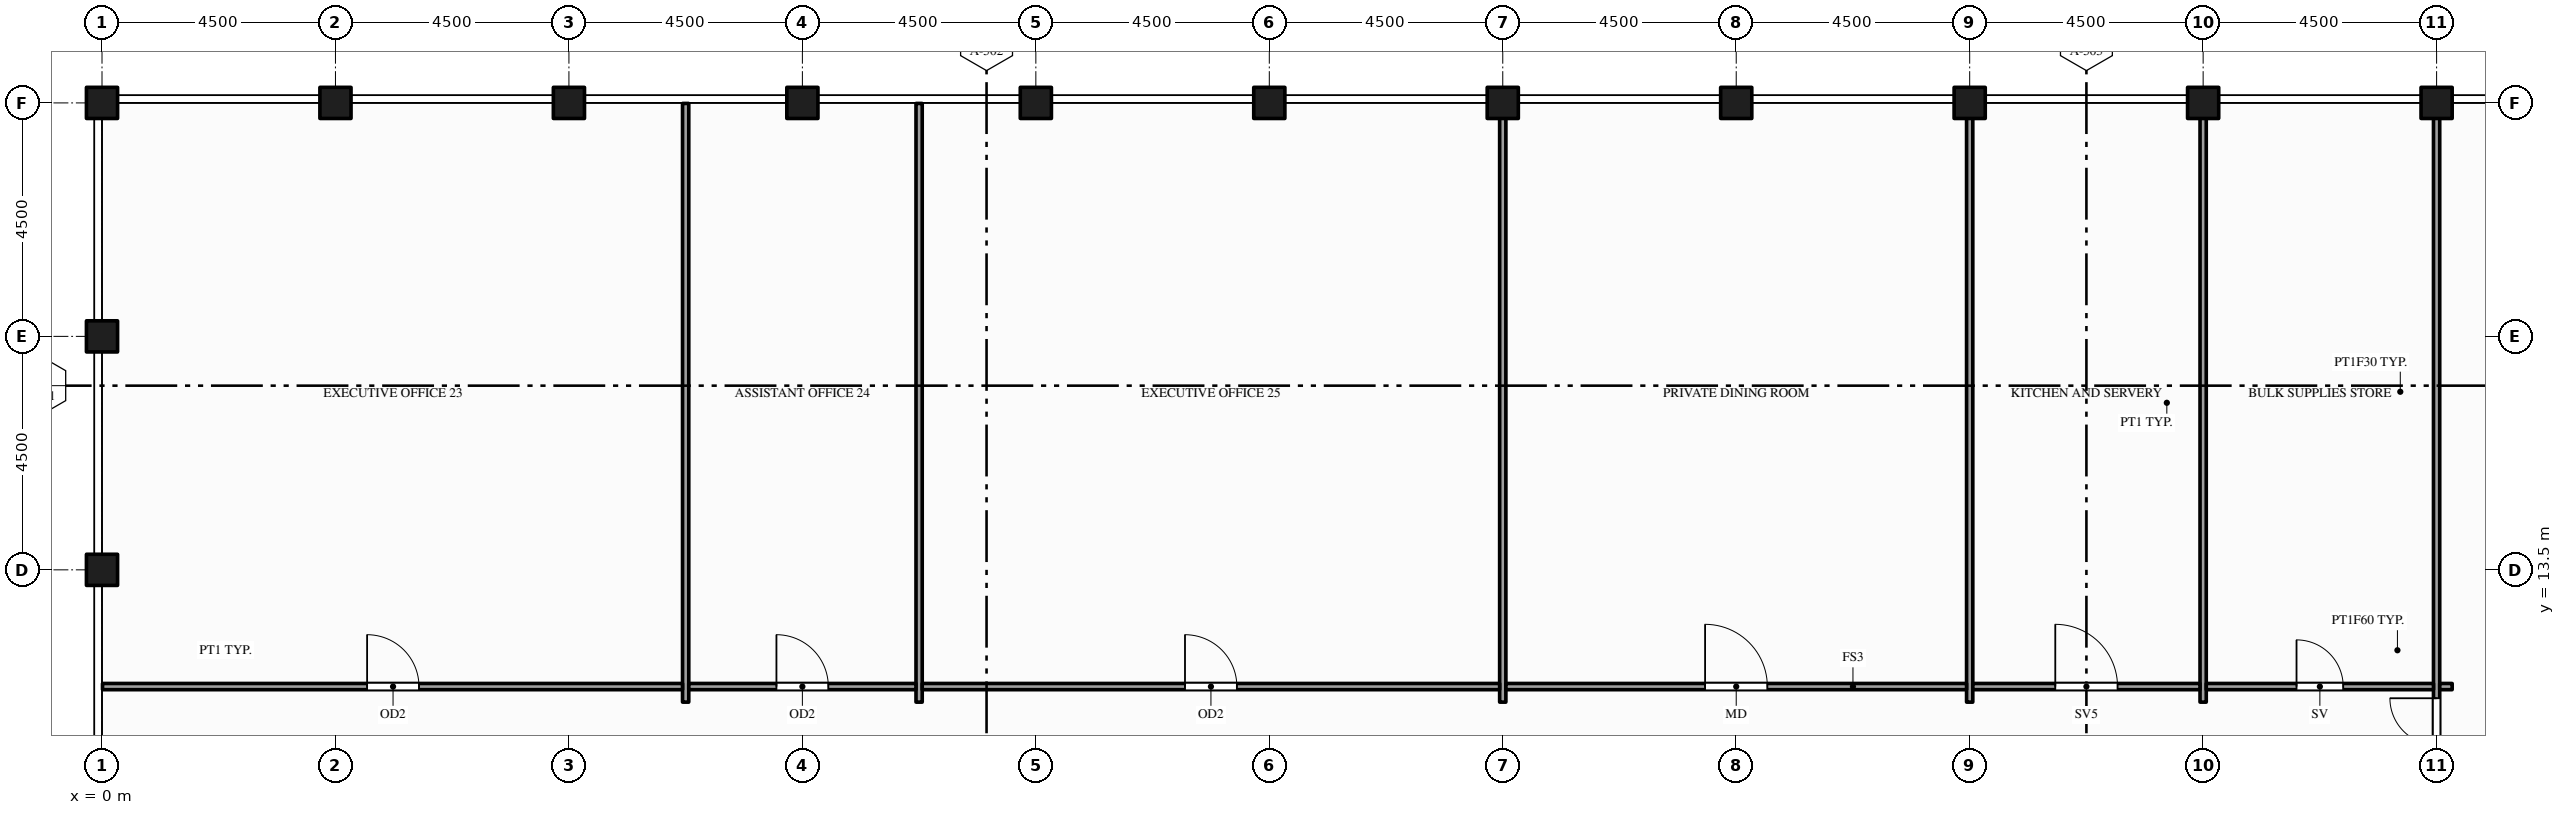
"""IFC4 building model, lengths in metres.
Left out: names, types, materials, properties, quantities, classifications, styles, units other than length and angle.
Written with IfcOpenShell. Run it as: python <this file> out.ifc"""

import sys

from ifc_helpers import new_model, si_unit, direction, frame, frame_2d, origin, origin_2d, place, context, subcontext, project, spatial, rectangle, hollow_rectangle, extrude, element, fill, save


model = new_model("IFC4")
c1 = context("Model", 3, precision=1e-05, world=origin(), true_north=direction((0.0, 1.0)))
c2 = subcontext(c1, "Body", "Model", "MODEL_VIEW")
j1 = project(units=[si_unit("LENGTHUNIT", "METRE"), si_unit("PLANEANGLEUNIT", "RADIAN")], contexts=[c1])
p1 = place(None, origin())
s1 = spatial("IfcSite", under=j1, at=p1, CompositionType="ELEMENT")
p2 = place(p1, origin())
s2 = spatial("IfcBuilding", under=s1, at=p2, CompositionType="ELEMENT")
p3 = place(p2, frame((0.0, 0.0, 314.0)))
s3 = spatial("IfcBuildingStorey", under=s2, at=p3, CompositionType="ELEMENT", Elevation=314.0)
for number, where, z_axis, x_axis in (
    (1, (0.0, 13.5, -0.15), (0.0, 0.0, 1.0), (1.0, 0.0, 0.0)),
    (2, (0.0, 18.0, -0.15), (0.0, 0.0, 1.0), (1.0, 0.0, 0.0)),
    (3, (0.0, 22.5, -0.15), (0.0, 0.0, 1.0), (1.0, 0.0, 0.0)),
    (4, (4.5, 22.5, -0.15), (0.0, 0.0, 1.0), (1.0, 0.0, 0.0)),
    (5, (9.0, 22.5, -0.15), (0.0, 0.0, 1.0), (1.0, 0.0, 0.0)),
    (6, (13.5, 22.5, -0.15), (0.0, 0.0, 1.0), (1.0, 0.0, 0.0)),
    (7, (18.0, 22.5, -0.15), (0.0, 0.0, 1.0), (1.0, 0.0, 0.0)),
    (8, (22.5, 22.5, -0.15), (0.0, 0.0, 1.0), (1.0, 0.0, 0.0)),
    (9, (27.0, 22.5, -0.15), (0.0, 0.0, 1.0), (1.0, 0.0, 0.0)),
    (10, (31.5, 22.5, -0.15), (0.0, 0.0, 1.0), (1.0, 0.0, 0.0)),
    (11, (36.0, 22.5, -0.15), (0.0, 0.0, 1.0), (1.0, 0.0, 0.0)),
    (12, (40.5, 22.5, -0.15), (0.0, 0.0, 1.0), (1.0, 0.0, 0.0)),
    (13, (45.0, 22.5, -0.15), (0.0, 0.0, 1.0), (1.0, 0.0, 0.0)),
):
    element("IfcColumn", number, at=place(p3, frame(where, z_axis=z_axis, x_axis=x_axis)), inside=s3, PredefinedType="COLUMN", context=c2, shape_type="SweptSolid", body=[
        extrude(hollow_rectangle(XDim=0.6, YDim=0.6, WallThickness=0.03, at=origin_2d()), origin(), (0.0, 0.0, 1.0), 4.5),
    ])
for number, where, z_axis, x_axis in (
    (14, (11.25, 10.95, 0.0), (0.0, 0.0, 1.0), (0.0, 1.0, 0.0)),
    (15, (15.75, 10.95, 0.0), (0.0, 0.0, 1.0), (0.0, 1.0, 0.0)),
    (16, (27.0, 10.95, 0.0), (0.0, 0.0, 1.0), (0.0, 1.0, 0.0)),
    (17, (36.0, 10.95, 0.0), (0.0, 0.0, 1.0), (0.0, 1.0, 0.0)),
    (18, (40.5, 10.95, 0.0), (0.0, 0.0, 1.0), (0.0, 1.0, 0.0)),
):
    element("IfcWall", number, at=place(p3, frame(where, z_axis=z_axis, x_axis=x_axis)), inside=s3, PredefinedType="PARTITIONING", context=c2, shape_type="SweptSolid", body=[
        extrude(rectangle(XDim=11.54, YDim=0.12, at=frame_2d((5.77, 0.0))), origin(), (0.0, 0.0, 1.0), 3.359),
    ])
p4 = place(p3, frame((45.0, 0.01, 0.0), z_axis=(0.0, 0.0, 1.0), x_axis=(0.0, 1.0, 0.0)))
e19 = element("IfcWall", 19, at=p4, inside=s3, PredefinedType="PARTITIONING", context=c2, shape_type="SweptSolid", body=[
    extrude(rectangle(XDim=22.48, YDim=0.12, at=frame_2d((11.24, 0.0))), origin(), (0.0, 0.0, 1.0), 3.359),
])
p5 = place(p4, frame((9.215, 0.0, 0.0)))
e20 = element("IfcOpeningElement", 20, at=p5, cuts=e19, PredefinedType="OPENING", context=c2, shape_type="SweptSolid", body=[
    extrude(rectangle(XDim=1.8, YDim=2.1, at=frame_2d((0.9, 1.05))), frame((0.0, 0.07, 0.0), z_axis=(0.0, -1.0, 0.0), x_axis=(1.0, 0.0, 0.0)), (0.0, 0.0, 1.0), 0.14),
])
p6 = place(p4, frame((0.99, 0.0, 0.0)))
e21 = element("IfcOpeningElement", 21, at=p6, cuts=e19, PredefinedType="OPENING", context=c2, shape_type="SweptSolid", body=[
    extrude(rectangle(XDim=0.9, YDim=2.1, at=frame_2d((0.45, 1.05))), frame((0.0, 0.07, 0.0), z_axis=(0.0, -1.0, 0.0), x_axis=(1.0, 0.0, 0.0)), (0.0, 0.0, 1.0), 0.14),
])
p7 = place(p4, frame((4.04, 0.0, 0.0)))
e22 = element("IfcOpeningElement", 22, at=p7, cuts=e19, PredefinedType="OPENING", context=c2, shape_type="SweptSolid", body=[
    extrude(rectangle(XDim=0.9, YDim=2.1, at=frame_2d((0.45, 1.05))), frame((0.0, 0.07, 0.0), z_axis=(0.0, -1.0, 0.0), x_axis=(1.0, 0.0, 0.0)), (0.0, 0.0, 1.0), 0.14),
])
p8 = place(p4, frame((6.99, 0.0, 0.0)))
e23 = element("IfcOpeningElement", 23, at=p8, cuts=e19, PredefinedType="OPENING", context=c2, shape_type="SweptSolid", body=[
    extrude(rectangle(XDim=1.0, YDim=2.1, at=frame_2d((0.5, 1.05))), frame((0.0, 0.07, 0.0), z_axis=(0.0, -1.0, 0.0), x_axis=(1.0, 0.0, 0.0)), (0.0, 0.0, 1.0), 0.14),
])
p9 = place(p3, frame((0.01, 11.25, 0.0), z_axis=(0.0, 0.0, 1.0), x_axis=(1.0, 0.0, 0.0)))
e24 = element("IfcWall", 24, at=p9, inside=s3, PredefinedType="PARTITIONING", context=c2, shape_type="SweptSolid", body=[
    extrude(rectangle(XDim=11.18, YDim=0.12, at=frame_2d((5.59, 0.0))), origin(), (0.0, 0.0, 1.0), 3.359),
])
p10 = place(p9, frame((5.1, 0.0, 0.0)))
e25 = element("IfcOpeningElement", 25, at=p10, cuts=e24, PredefinedType="OPENING", context=c2, shape_type="SweptSolid", body=[
    extrude(rectangle(XDim=1.0, YDim=2.1, at=frame_2d((0.5, 1.05))), frame((0.0, 0.07, 0.0), z_axis=(0.0, -1.0, 0.0), x_axis=(1.0, 0.0, 0.0)), (0.0, 0.0, 1.0), 0.14),
])
p11 = place(p3, frame((11.31, 11.25, 0.0), z_axis=(0.0, 0.0, 1.0), x_axis=(1.0, 0.0, 0.0)))
e26 = element("IfcWall", 26, at=p11, inside=s3, PredefinedType="PARTITIONING", context=c2, shape_type="SweptSolid", body=[
    extrude(rectangle(XDim=4.38, YDim=0.12, at=frame_2d((2.19, 0.0))), origin(), (0.0, 0.0, 1.0), 3.359),
])
p12 = place(p11, frame((1.69, 0.0, 0.0)))
e27 = element("IfcOpeningElement", 27, at=p12, cuts=e26, PredefinedType="OPENING", context=c2, shape_type="SweptSolid", body=[
    extrude(rectangle(XDim=1.0, YDim=2.1, at=frame_2d((0.5, 1.05))), frame((0.0, 0.07, 0.0), z_axis=(0.0, -1.0, 0.0), x_axis=(1.0, 0.0, 0.0)), (0.0, 0.0, 1.0), 0.14),
])
p13 = place(p3, frame((15.81, 11.25, 0.0), z_axis=(0.0, 0.0, 1.0), x_axis=(1.0, 0.0, 0.0)))
e28 = element("IfcWall", 28, at=p13, inside=s3, PredefinedType="PARTITIONING", context=c2, shape_type="SweptSolid", body=[
    extrude(rectangle(XDim=11.13, YDim=0.12, at=frame_2d((5.565, 0.0))), origin(), (0.0, 0.0, 1.0), 3.359),
])
p14 = place(p13, frame((5.065, 0.0, 0.0)))
e29 = element("IfcOpeningElement", 29, at=p14, cuts=e28, PredefinedType="OPENING", context=c2, shape_type="SweptSolid", body=[
    extrude(rectangle(XDim=1.0, YDim=2.1, at=frame_2d((0.5, 1.05))), frame((0.0, 0.07, 0.0), z_axis=(0.0, -1.0, 0.0), x_axis=(1.0, 0.0, 0.0)), (0.0, 0.0, 1.0), 0.14),
])
p15 = place(p3, frame((27.06, 11.25, 0.0), z_axis=(0.0, 0.0, 1.0), x_axis=(1.0, 0.0, 0.0)))
e30 = element("IfcWall", 30, at=p15, inside=s3, PredefinedType="PARTITIONING", context=c2, shape_type="SweptSolid", body=[
    extrude(rectangle(XDim=8.88, YDim=0.12, at=frame_2d((4.44, 0.0))), origin(), (0.0, 0.0, 1.0), 3.359),
])
p16 = place(p15, frame((3.84, 0.0, 0.0)))
e31 = element("IfcOpeningElement", 31, at=p16, cuts=e30, PredefinedType="OPENING", context=c2, shape_type="SweptSolid", body=[
    extrude(rectangle(XDim=1.2, YDim=2.1, at=frame_2d((0.6, 1.05))), frame((0.0, 0.07, 0.0), z_axis=(0.0, -1.0, 0.0), x_axis=(1.0, 0.0, 0.0)), (0.0, 0.0, 1.0), 0.14),
])
p17 = place(p3, frame((36.06, 11.25, 0.0), z_axis=(0.0, 0.0, 1.0), x_axis=(1.0, 0.0, 0.0)))
e32 = element("IfcWall", 32, at=p17, inside=s3, PredefinedType="PARTITIONING", context=c2, shape_type="SweptSolid", body=[
    extrude(rectangle(XDim=4.38, YDim=0.12, at=frame_2d((2.19, 0.0))), origin(), (0.0, 0.0, 1.0), 3.359),
])
p18 = place(p17, frame((1.59, 0.0, 0.0)))
e33 = element("IfcOpeningElement", 33, at=p18, cuts=e32, PredefinedType="OPENING", context=c2, shape_type="SweptSolid", body=[
    extrude(rectangle(XDim=1.2, YDim=2.1, at=frame_2d((0.6, 1.05))), frame((0.0, 0.07, 0.0), z_axis=(0.0, -1.0, 0.0), x_axis=(1.0, 0.0, 0.0)), (0.0, 0.0, 1.0), 0.14),
])
p19 = place(p3, frame((40.56, 11.25, 0.0), z_axis=(0.0, 0.0, 1.0), x_axis=(1.0, 0.0, 0.0)))
e34 = element("IfcWall", 34, at=p19, inside=s3, PredefinedType="PARTITIONING", context=c2, shape_type="SweptSolid", body=[
    extrude(rectangle(XDim=4.38, YDim=0.12, at=frame_2d((2.19, 0.0))), origin(), (0.0, 0.0, 1.0), 3.359),
])
p20 = place(p19, frame((1.74, 0.0, 0.0)))
e35 = element("IfcOpeningElement", 35, at=p20, cuts=e34, PredefinedType="OPENING", context=c2, shape_type="SweptSolid", body=[
    extrude(rectangle(XDim=0.9, YDim=2.1, at=frame_2d((0.45, 1.05))), frame((0.0, 0.07, 0.0), z_axis=(0.0, -1.0, 0.0), x_axis=(1.0, 0.0, 0.0)), (0.0, 0.0, 1.0), 0.14),
])
p21 = place(p3, frame((45.06, 11.25, 0.0), z_axis=(0.0, 0.0, 1.0), x_axis=(1.0, 0.0, 0.0)))
e36 = element("IfcWall", 36, at=p21, inside=s3, PredefinedType="PARTITIONING", context=c2, shape_type="SweptSolid", body=[
    extrude(rectangle(XDim=0.24, YDim=0.12, at=frame_2d((0.12, 0.0))), origin(), (0.0, 0.0, 1.0), 3.359),
])
p22 = place(p5, origin())
e37 = element("IfcDoor", 37, at=p22, inside=s3, OperationType="DOUBLE_DOOR_SINGLE_SWING", PredefinedType="DOOR", context=c2, shape_type="SweptSolid", body=[
    extrude(rectangle(XDim=1.8, YDim=2.1, at=frame_2d((0.9, 1.05))), frame((0.0, 0.025, 0.0), z_axis=(0.0, -1.0, 0.0), x_axis=(1.0, 0.0, 0.0)), (0.0, 0.0, 1.0), 0.05),
])
fill(e20, e37)
p23 = place(p10, origin())
e38 = element("IfcDoor", 38, at=p23, inside=s3, OperationType="SINGLE_SWING_LEFT", PredefinedType="DOOR", context=c2, shape_type="SweptSolid", body=[
    extrude(rectangle(XDim=1.0, YDim=2.1, at=frame_2d((0.5, 1.05))), frame((0.0, 0.025, 0.0), z_axis=(0.0, -1.0, 0.0), x_axis=(1.0, 0.0, 0.0)), (0.0, 0.0, 1.0), 0.05),
])
fill(e25, e38)
p24 = place(p12, origin())
e39 = element("IfcDoor", 39, at=p24, inside=s3, OperationType="SINGLE_SWING_LEFT", PredefinedType="DOOR", context=c2, shape_type="SweptSolid", body=[
    extrude(rectangle(XDim=1.0, YDim=2.1, at=frame_2d((0.5, 1.05))), frame((0.0, 0.025, 0.0), z_axis=(0.0, -1.0, 0.0), x_axis=(1.0, 0.0, 0.0)), (0.0, 0.0, 1.0), 0.05),
])
fill(e27, e39)
p25 = place(p14, origin())
e40 = element("IfcDoor", 40, at=p25, inside=s3, OperationType="SINGLE_SWING_LEFT", PredefinedType="DOOR", context=c2, shape_type="SweptSolid", body=[
    extrude(rectangle(XDim=1.0, YDim=2.1, at=frame_2d((0.5, 1.05))), frame((0.0, 0.025, 0.0), z_axis=(0.0, -1.0, 0.0), x_axis=(1.0, 0.0, 0.0)), (0.0, 0.0, 1.0), 0.05),
])
fill(e29, e40)
p26 = place(p16, origin())
e41 = element("IfcDoor", 41, at=p26, inside=s3, OperationType="SINGLE_SWING_LEFT", PredefinedType="DOOR", context=c2, shape_type="SweptSolid", body=[
    extrude(rectangle(XDim=1.2, YDim=2.1, at=frame_2d((0.6, 1.05))), frame((0.0, 0.025, 0.0), z_axis=(0.0, -1.0, 0.0), x_axis=(1.0, 0.0, 0.0)), (0.0, 0.0, 1.0), 0.05),
])
fill(e31, e41)
p27 = place(p18, origin())
e42 = element("IfcDoor", 42, at=p27, inside=s3, OperationType="SINGLE_SWING_LEFT", PredefinedType="DOOR", context=c2, shape_type="SweptSolid", body=[
    extrude(rectangle(XDim=1.2, YDim=2.1, at=frame_2d((0.6, 1.05))), frame((0.0, 0.025, 0.0), z_axis=(0.0, -1.0, 0.0), x_axis=(1.0, 0.0, 0.0)), (0.0, 0.0, 1.0), 0.05),
])
fill(e33, e42)
p28 = place(p20, origin())
e43 = element("IfcDoor", 43, at=p28, inside=s3, OperationType="SINGLE_SWING_LEFT", PredefinedType="DOOR", context=c2, shape_type="SweptSolid", body=[
    extrude(rectangle(XDim=0.9, YDim=2.1, at=frame_2d((0.45, 1.05))), frame((0.0, 0.025, 0.0), z_axis=(0.0, -1.0, 0.0), x_axis=(1.0, 0.0, 0.0)), (0.0, 0.0, 1.0), 0.05),
])
fill(e35, e43)
save(model, sys.argv[1])
